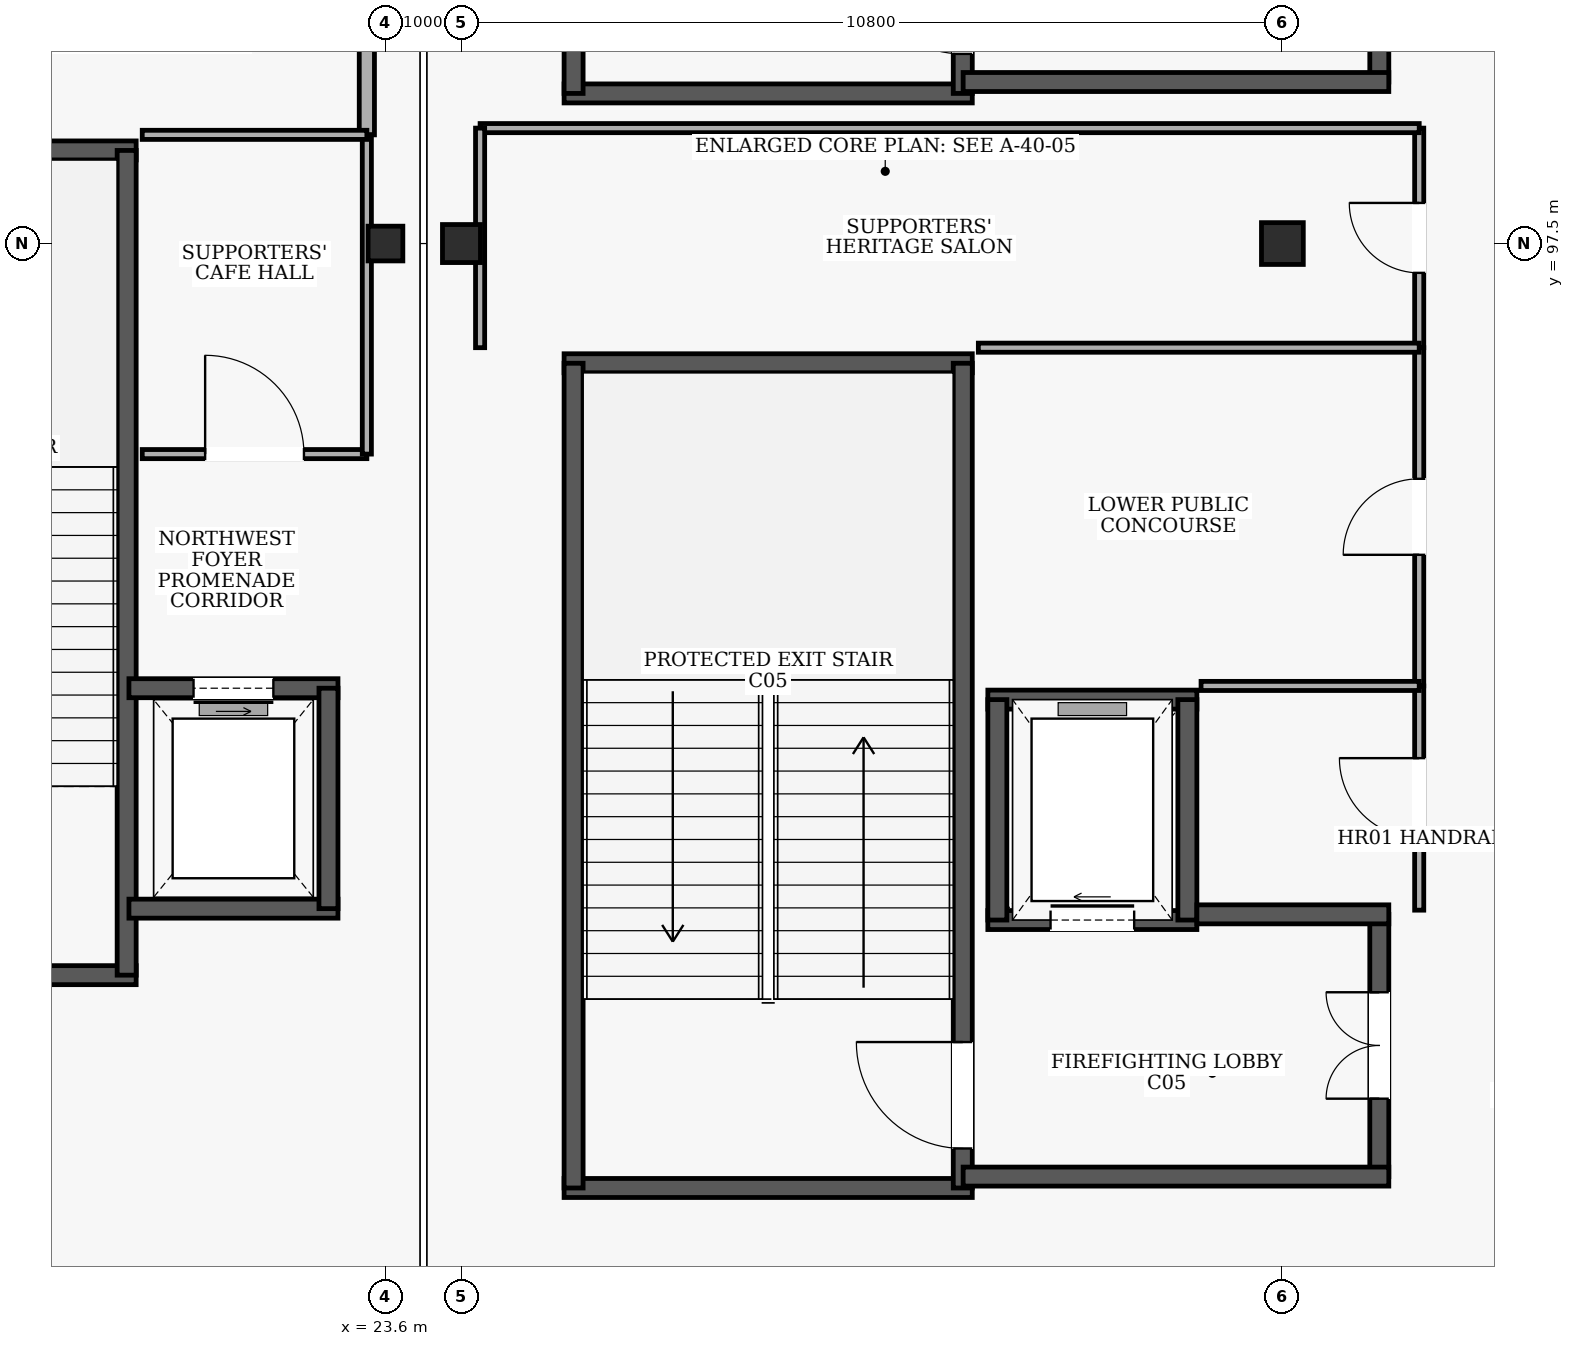
"""IFC4 building model, lengths in metres.
Left out: names, types, materials, properties, quantities, classifications, styles, units other than length and angle.
Written with IfcOpenShell. Run it as: python <this file> out.ifc"""

import sys

from ifc_helpers import new_model, si_unit, direction, frame, frame_2d, origin, origin_2d, place, context, subcontext, project, spatial, rectangle, hollow_circle, extrude, element, fill, save


model = new_model("IFC4")
c1 = context("Model", 3, precision=1e-05, world=origin(), true_north=direction((0.0, 1.0)))
c2 = subcontext(c1, "Body", "Model", "MODEL_VIEW")
j1 = project(units=[si_unit("LENGTHUNIT", "METRE"), si_unit("PLANEANGLEUNIT", "RADIAN")], contexts=[c1])
p1 = place(None, origin())
s1 = spatial("IfcSite", under=j1, at=p1, CompositionType="ELEMENT")
p2 = place(p1, origin())
s2 = spatial("IfcBuilding", under=s1, at=p2, CompositionType="ELEMENT")
p3 = place(p2, frame((0.0, 0.0, 5.4)))
s3 = spatial("IfcBuildingStorey", under=s2, at=p3, CompositionType="ELEMENT", Elevation=5.4)
p4 = place(p3, frame((23.6, 97.5, 0.0), z_axis=(0.0, 0.0, 1.0), x_axis=(1.0, 0.0, 0.0)))
e1 = element("IfcColumn", 1, at=p4, inside=s3, PredefinedType="COLUMN", context=c2, shape_type="SweptSolid", body=[
    extrude(hollow_circle(Radius=0.229, WallThickness=0.02, at=origin_2d()), origin(), (0.0, 0.0, 1.0), 4.8),
])
p5 = place(p3, frame((24.6, 97.5, 0.0), z_axis=(0.0, 0.0, 1.0), x_axis=(1.0, 0.0, 0.0)))
e2 = element("IfcColumn", 2, at=p5, inside=s3, PredefinedType="COLUMN", context=c2, shape_type="SweptSolid", body=[
    extrude(rectangle(XDim=0.5, YDim=0.5, at=origin_2d()), origin(), (0.0, 0.0, 1.0), 4.8),
])
p6 = place(p3, frame((35.4, 97.5, 0.0), z_axis=(0.0, 0.0, 1.0), x_axis=(1.0, 0.0, 0.0)))
e3 = element("IfcColumn", 3, at=p6, inside=s3, PredefinedType="COLUMN", context=c2, shape_type="SweptSolid", body=[
    extrude(rectangle(XDim=0.55, YDim=0.55, at=origin_2d()), origin(), (0.0, 0.0, 1.0), 4.8),
])
for number, where, z_axis, x_axis in (
    (4, (25.95, 85.075, 0.0), (0.0, 0.0, 1.0), (1.0, 0.0, 0.0)),
    (5, (31.32, 95.925, 0.0), (0.0, 0.0, 1.0), (-1.0, 0.0, 0.0)),
):
    element("IfcWall", number, at=place(p3, frame(where, z_axis=z_axis, x_axis=x_axis)), inside=s3, PredefinedType="SHEAR", context=c2, shape_type="SweptSolid", body=[
        extrude(rectangle(XDim=5.37, YDim=0.25, at=frame_2d((2.685, 0.0))), origin(), (0.0, 0.0, 1.0), 4.5),
    ])
p7 = place(p3, frame((26.075, 85.075, 0.0), z_axis=(0.0, 0.0, 1.0), x_axis=(0.0, 1.0, 0.0)))
e6 = element("IfcWall", 6, at=p7, inside=s3, PredefinedType="SHEAR", context=c2, shape_type="SweptSolid", body=[
    extrude(rectangle(XDim=10.85, YDim=0.25, at=frame_2d((5.425, 0.0))), origin(), (0.0, 0.0, 1.0), 4.5),
])
p8 = place(p3, frame((31.195, 85.075, 0.0), z_axis=(0.0, 0.0, 1.0), x_axis=(0.0, 1.0, 0.0)))
e7 = element("IfcWall", 7, at=p8, inside=s3, PredefinedType="SHEAR", context=c2, shape_type="SweptSolid", body=[
    extrude(rectangle(XDim=10.85, YDim=0.25, at=frame_2d((5.425, 0.0))), origin(), (0.0, 0.0, 1.0), 4.5),
])
p9 = place(p8, frame((0.52, 0.0, 0.0)))
e8 = element("IfcOpeningElement", 8, at=p9, cuts=e7, PredefinedType="OPENING", context=c2, shape_type="SweptSolid", body=[
    extrude(rectangle(XDim=1.4, YDim=2.15, at=frame_2d((0.7, 1.075))), frame((0.0, 0.135, 0.0), z_axis=(0.0, -1.0, 0.0), x_axis=(1.0, 0.0, 0.0)), (0.0, 0.0, 1.0), 0.27),
])
p10 = place(p3, frame((25.95, 99.475, 0.0), z_axis=(0.0, 0.0, 1.0), x_axis=(1.0, 0.0, 0.0)))
e9 = element("IfcWall", 9, at=p10, inside=s3, PredefinedType="SHEAR", context=c2, shape_type="SweptSolid", body=[
    extrude(rectangle(XDim=5.37, YDim=0.25, at=frame_2d((2.685, 0.0))), origin(), (0.0, 0.0, 1.0), 4.5),
])
p11 = place(p3, frame((26.075, 99.475, 0.0), z_axis=(0.0, 0.0, 1.0), x_axis=(0.0, 1.0, 0.0)))
e10 = element("IfcWall", 10, at=p11, inside=s3, PredefinedType="SHEAR", context=c2, shape_type="SweptSolid", body=[
    extrude(rectangle(XDim=10.85, YDim=0.25, at=frame_2d((5.425, 0.0))), origin(), (0.0, 0.0, 1.0), 4.5),
])
p12 = place(p3, frame((31.195, 99.475, 0.0), z_axis=(0.0, 0.0, 1.0), x_axis=(0.0, 1.0, 0.0)))
e11 = element("IfcWall", 11, at=p12, inside=s3, PredefinedType="SHEAR", context=c2, shape_type="SweptSolid", body=[
    extrude(rectangle(XDim=10.85, YDim=0.25, at=frame_2d((5.425, 0.0))), origin(), (0.0, 0.0, 1.0), 4.5),
])
p13 = place(p12, frame((0.52, 0.0, 0.0)))
e12 = element("IfcOpeningElement", 12, at=p13, cuts=e11, PredefinedType="OPENING", context=c2, shape_type="SweptSolid", body=[
    extrude(rectangle(XDim=1.4, YDim=2.15, at=frame_2d((0.7, 1.075))), frame((0.0, 0.135, 0.0), z_axis=(0.0, -1.0, 0.0), x_axis=(1.0, 0.0, 0.0)), (0.0, 0.0, 1.0), 0.27),
])
for number, where, z_axis, x_axis in (
    (13, (14.95, 87.875, 0.0), (0.0, 0.0, 1.0), (1.0, 0.0, 0.0)),
    (14, (20.32, 98.725, 0.0), (0.0, 0.0, 1.0), (-1.0, 0.0, 0.0)),
):
    element("IfcWall", number, at=place(p3, frame(where, z_axis=z_axis, x_axis=x_axis)), inside=s3, PredefinedType="SHEAR", context=c2, shape_type="SweptSolid", body=[
        extrude(rectangle(XDim=5.37, YDim=0.25, at=frame_2d((2.685, 0.0))), origin(), (0.0, 0.0, 1.0), 4.5),
    ])
p14 = place(p3, frame((20.195, 87.875, 0.0), z_axis=(0.0, 0.0, 1.0), x_axis=(0.0, 1.0, 0.0)))
e15 = element("IfcWall", 15, at=p14, inside=s3, PredefinedType="SHEAR", context=c2, shape_type="SweptSolid", body=[
    extrude(rectangle(XDim=10.85, YDim=0.25, at=frame_2d((5.425, 0.0))), origin(), (0.0, 0.0, 1.0), 4.5),
])
p15 = place(p3, frame((31.525, 88.6, 0.0), z_axis=(0.0, 0.0, 1.0), x_axis=(1.0, 0.0, 0.0)))
e16 = element("IfcWall", 16, at=p15, inside=s3, PredefinedType="SHEAR", context=c2, shape_type="SweptSolid", body=[
    extrude(rectangle(XDim=2.75, YDim=0.25, at=frame_2d((1.375, 0.0))), origin(), (0.0, 0.0, 1.0), 4.5),
])
p16 = place(p15, frame((0.825, 0.0, 0.0)))
e17 = element("IfcOpeningElement", 17, at=p16, cuts=e16, PredefinedType="OPENING", context=c2, shape_type="SweptSolid", body=[
    extrude(rectangle(XDim=1.1, YDim=2.15, at=frame_2d((0.55, 1.075))), frame((0.0, 0.135, 0.0), z_axis=(0.0, -1.0, 0.0), x_axis=(1.0, 0.0, 0.0)), (0.0, 0.0, 1.0), 0.27),
])
p17 = place(p3, frame((34.275, 91.5, 0.0), z_axis=(0.0, 0.0, 1.0), x_axis=(-1.0, 0.0, 0.0)))
e18 = element("IfcWall", 18, at=p17, inside=s3, PredefinedType="SHEAR", context=c2, shape_type="SweptSolid", body=[
    extrude(rectangle(XDim=2.75, YDim=0.25, at=frame_2d((1.375, 0.0))), origin(), (0.0, 0.0, 1.0), 4.5),
])
for number, where, z_axis, x_axis in (
    (19, (31.65, 91.5, 0.0), (0.0, 0.0, 1.0), (0.0, -1.0, 0.0)),
    (20, (34.15, 88.6, 0.0), (0.0, 0.0, 1.0), (0.0, 1.0, 0.0)),
):
    element("IfcWall", number, at=place(p3, frame(where, z_axis=z_axis, x_axis=x_axis)), inside=s3, PredefinedType="SHEAR", context=c2, shape_type="SweptSolid", body=[
        extrude(rectangle(XDim=2.9, YDim=0.25, at=frame_2d((1.45, 0.0))), origin(), (0.0, 0.0, 1.0), 4.5),
    ])
p18 = place(p3, frame((36.675, 85.225, 0.0), z_axis=(0.0, 0.0, 1.0), x_axis=(0.0, 1.0, 0.0)))
e21 = element("IfcWall", 21, at=p18, inside=s3, PredefinedType="SHEAR", context=c2, shape_type="SweptSolid", body=[
    extrude(rectangle(XDim=3.45, YDim=0.25, at=frame_2d((1.725, 0.0))), origin(), (0.0, 0.0, 1.0), 4.5),
])
p19 = place(p18, frame((1.025, 0.0, 0.0)))
e22 = element("IfcOpeningElement", 22, at=p19, cuts=e21, PredefinedType="OPENING", context=c2, shape_type="SweptSolid", body=[
    extrude(rectangle(XDim=1.4, YDim=2.15, at=frame_2d((0.7, 1.075))), frame((0.0, 0.135, 0.0), z_axis=(0.0, -1.0, 0.0), x_axis=(1.0, 0.0, 0.0)), (0.0, 0.0, 1.0), 0.27),
])
p20 = place(p3, frame((34.275, 88.675, 0.0), z_axis=(0.0, 0.0, 1.0), x_axis=(1.0, 0.0, 0.0)))
e23 = element("IfcWall", 23, at=p20, inside=s3, PredefinedType="SHEAR", context=c2, shape_type="SweptSolid", body=[
    extrude(rectangle(XDim=2.525, YDim=0.25, at=frame_2d((1.263, 0.0))), origin(), (0.0, 0.0, 1.0), 4.5),
])
p21 = place(p3, frame((31.2, 85.225, 0.0), z_axis=(0.0, 0.0, 1.0), x_axis=(1.0, 0.0, 0.0)))
e24 = element("IfcWall", 24, at=p21, inside=s3, PredefinedType="SHEAR", context=c2, shape_type="SweptSolid", body=[
    extrude(rectangle(XDim=5.6, YDim=0.25, at=frame_2d((2.8, 0.0))), origin(), (0.0, 0.0, 1.0), 4.5),
])
p22 = place(p3, frame((36.675, 99.625, 0.0), z_axis=(0.0, 0.0, 1.0), x_axis=(0.0, 1.0, 0.0)))
e25 = element("IfcWall", 25, at=p22, inside=s3, PredefinedType="SHEAR", context=c2, shape_type="SweptSolid", body=[
    extrude(rectangle(XDim=3.45, YDim=0.25, at=frame_2d((1.725, 0.0))), origin(), (0.0, 0.0, 1.0), 4.5),
])
p23 = place(p22, frame((1.025, 0.0, 0.0)))
e26 = element("IfcOpeningElement", 26, at=p23, cuts=e25, PredefinedType="OPENING", context=c2, shape_type="SweptSolid", body=[
    extrude(rectangle(XDim=1.4, YDim=2.15, at=frame_2d((0.7, 1.075))), frame((0.0, 0.135, 0.0), z_axis=(0.0, -1.0, 0.0), x_axis=(1.0, 0.0, 0.0)), (0.0, 0.0, 1.0), 0.27),
])
p24 = place(p3, frame((31.2, 99.625, 0.0), z_axis=(0.0, 0.0, 1.0), x_axis=(1.0, 0.0, 0.0)))
e27 = element("IfcWall", 27, at=p24, inside=s3, PredefinedType="SHEAR", context=c2, shape_type="SweptSolid", body=[
    extrude(rectangle(XDim=5.6, YDim=0.25, at=frame_2d((2.8, 0.0))), origin(), (0.0, 0.0, 1.0), 4.5),
])
p25 = place(p3, frame((20.225, 88.75, 0.0), z_axis=(0.0, 0.0, 1.0), x_axis=(1.0, 0.0, 0.0)))
e28 = element("IfcWall", 28, at=p25, inside=s3, PredefinedType="SHEAR", context=c2, shape_type="SweptSolid", body=[
    extrude(rectangle(XDim=2.75, YDim=0.25, at=frame_2d((1.375, 0.0))), origin(), (0.0, 0.0, 1.0), 4.5),
])
p26 = place(p3, frame((22.975, 91.65, 0.0), z_axis=(0.0, 0.0, 1.0), x_axis=(-1.0, 0.0, 0.0)))
e29 = element("IfcWall", 29, at=p26, inside=s3, PredefinedType="SHEAR", context=c2, shape_type="SweptSolid", body=[
    extrude(rectangle(XDim=2.75, YDim=0.25, at=frame_2d((1.375, 0.0))), origin(), (0.0, 0.0, 1.0), 4.5),
])
p27 = place(p26, frame((0.85, 0.0, 0.0)))
e30 = element("IfcOpeningElement", 30, at=p27, cuts=e29, PredefinedType="OPENING", context=c2, shape_type="SweptSolid", body=[
    extrude(rectangle(XDim=1.05, YDim=2.15, at=frame_2d((0.525, 1.075))), frame((0.0, 0.135, 0.0), z_axis=(0.0, -1.0, 0.0), x_axis=(1.0, 0.0, 0.0)), (0.0, 0.0, 1.0), 0.27),
])
p28 = place(p3, frame((22.85, 88.75, 0.0), z_axis=(0.0, 0.0, 1.0), x_axis=(0.0, 1.0, 0.0)))
e31 = element("IfcWall", 31, at=p28, inside=s3, PredefinedType="SHEAR", context=c2, shape_type="SweptSolid", body=[
    extrude(rectangle(XDim=2.9, YDim=0.25, at=frame_2d((1.45, 0.0))), origin(), (0.0, 0.0, 1.0), 4.5),
])
p29 = place(p3, frame((37.2, 96.13, 0.0), z_axis=(0.0, 0.0, 1.0), x_axis=(0.0, 1.0, 0.0)))
e32 = element("IfcWall", 32, at=p29, inside=s3, PredefinedType="PARTITIONING", context=c2, shape_type="SweptSolid", body=[
    extrude(rectangle(XDim=2.889, YDim=0.12, at=frame_2d((1.444, 0.0))), origin(), (0.0, 0.0, 1.0), 4.5),
])
p30 = place(p29, frame((0.984, 0.0, 0.0)))
e33 = element("IfcOpeningElement", 33, at=p30, cuts=e32, PredefinedType="OPENING", context=c2, shape_type="SweptSolid", body=[
    extrude(rectangle(XDim=0.92, YDim=2.1, at=frame_2d((0.46, 1.05))), frame((0.0, 0.07, 0.0), z_axis=(0.0, -1.0, 0.0), x_axis=(1.0, 0.0, 0.0)), (0.0, 0.0, 1.0), 0.14),
])
p31 = place(p3, frame((37.2, 99.019, 0.0), z_axis=(0.0, 0.0, 1.0), x_axis=(-1.0, 0.0, 0.0)))
e34 = element("IfcWall", 34, at=p31, inside=s3, PredefinedType="PARTITIONING", context=c2, shape_type="SweptSolid", body=[
    extrude(rectangle(XDim=12.355, YDim=0.12, at=frame_2d((6.177, 0.0))), origin(), (0.0, 0.0, 1.0), 4.5),
])
p32 = place(p3, frame((24.845, 99.019, 0.0), z_axis=(0.0, 0.0, 1.0), x_axis=(0.0, -1.0, 0.0)))
e35 = element("IfcWall", 35, at=p32, inside=s3, PredefinedType="PARTITIONING", context=c2, shape_type="SweptSolid", body=[
    extrude(rectangle(XDim=2.889, YDim=0.12, at=frame_2d((1.444, 0.0))), origin(), (0.0, 0.0, 1.0), 3.58),
])
p33 = place(p3, frame((37.2, 91.68, 0.0), z_axis=(0.0, 0.0, 1.0), x_axis=(0.0, 1.0, 0.0)))
e36 = element("IfcWall", 36, at=p33, inside=s3, PredefinedType="PARTITIONING", context=c2, shape_type="SweptSolid", body=[
    extrude(rectangle(XDim=4.45, YDim=0.12, at=frame_2d((2.225, 0.0))), origin(), (0.0, 0.0, 1.0), 4.5),
])
p34 = place(p33, frame((1.725, 0.0, 0.0)))
e37 = element("IfcOpeningElement", 37, at=p34, cuts=e36, PredefinedType="OPENING", context=c2, shape_type="SweptSolid", body=[
    extrude(rectangle(XDim=1.0, YDim=2.1, at=frame_2d((0.5, 1.05))), frame((0.0, 0.07, 0.0), z_axis=(0.0, -1.0, 0.0), x_axis=(1.0, 0.0, 0.0)), (0.0, 0.0, 1.0), 0.14),
])
p35 = place(p3, frame((37.2, 96.13, 0.0), z_axis=(0.0, 0.0, 1.0), x_axis=(-1.0, 0.0, 0.0)))
e38 = element("IfcWall", 38, at=p35, inside=s3, PredefinedType="PARTITIONING", context=c2, shape_type="SweptSolid", body=[
    extrude(rectangle(XDim=5.8, YDim=0.12, at=frame_2d((2.9, 0.0))), origin(), (0.0, 0.0, 1.0), 4.5),
])
p36 = place(p3, frame((37.2, 88.73, 0.0), z_axis=(0.0, 0.0, 1.0), x_axis=(0.0, 1.0, 0.0)))
e39 = element("IfcWall", 39, at=p36, inside=s3, PredefinedType="PARTITIONING", context=c2, shape_type="SweptSolid", body=[
    extrude(rectangle(XDim=2.95, YDim=0.12, at=frame_2d((1.475, 0.0))), origin(), (0.0, 0.0, 1.0), 4.5),
])
p37 = place(p36, frame((0.95, 0.0, 0.0)))
e40 = element("IfcOpeningElement", 40, at=p37, cuts=e39, PredefinedType="OPENING", context=c2, shape_type="SweptSolid", body=[
    extrude(rectangle(XDim=1.05, YDim=2.15, at=frame_2d((0.525, 1.075))), frame((0.0, 0.07, 0.0), z_axis=(0.0, -1.0, 0.0), x_axis=(1.0, 0.0, 0.0)), (0.0, 0.0, 1.0), 0.14),
])
p38 = place(p3, frame((37.2, 91.68, 0.0), z_axis=(0.0, 0.0, 1.0), x_axis=(-1.0, 0.0, 0.0)))
e41 = element("IfcWall", 41, at=p38, inside=s3, PredefinedType="PARTITIONING", context=c2, shape_type="SweptSolid", body=[
    extrude(rectangle(XDim=2.87, YDim=0.12, at=frame_2d((1.435, 0.0))), origin(), (0.0, 0.0, 1.0), 4.5),
])
p39 = place(p3, frame((23.355, 98.93, 0.0), z_axis=(0.0, 0.0, 1.0), x_axis=(0.0, 1.0, 0.0)))
e42 = element("IfcWall", 42, at=p39, inside=s3, PredefinedType="PARTITIONING", context=c2, shape_type="SweptSolid", body=[
    extrude(rectangle(XDim=12.12, YDim=0.2, at=frame_2d((6.06, 0.0))), origin(), (0.0, 0.0, 1.0), 3.78),
])
p40 = place(p3, frame((20.4, 94.73, 0.0), z_axis=(0.0, 0.0, 1.0), x_axis=(1.0, 0.0, 0.0)))
e43 = element("IfcWall", 43, at=p40, inside=s3, PredefinedType="PARTITIONING", context=c2, shape_type="SweptSolid", body=[
    extrude(rectangle(XDim=2.955, YDim=0.12, at=frame_2d((1.478, 0.0))), origin(), (0.0, 0.0, 1.0), 4.5),
])
p41 = place(p40, frame((0.827, 0.0, 0.0)))
e44 = element("IfcOpeningElement", 44, at=p41, cuts=e43, PredefinedType="OPENING", context=c2, shape_type="SweptSolid", body=[
    extrude(rectangle(XDim=1.3, YDim=2.2, at=frame_2d((0.65, 1.1))), frame((0.0, 0.07, 0.0), z_axis=(0.0, -1.0, 0.0), x_axis=(1.0, 0.0, 0.0)), (0.0, 0.0, 1.0), 0.14),
])
p42 = place(p3, frame((23.355, 94.73, 0.0), z_axis=(0.0, 0.0, 1.0), x_axis=(0.0, 1.0, 0.0)))
e45 = element("IfcWall", 45, at=p42, inside=s3, PredefinedType="PARTITIONING", context=c2, shape_type="SweptSolid", body=[
    extrude(rectangle(XDim=4.2, YDim=0.12, at=frame_2d((2.1, 0.0))), origin(), (0.0, 0.0, 1.0), 3.78),
])
p43 = place(p3, frame((23.355, 98.93, 0.0), z_axis=(0.0, 0.0, 1.0), x_axis=(-1.0, 0.0, 0.0)))
e46 = element("IfcWall", 46, at=p43, inside=s3, PredefinedType="PARTITIONING", context=c2, shape_type="SweptSolid", body=[
    extrude(rectangle(XDim=2.955, YDim=0.12, at=frame_2d((1.478, 0.0))), origin(), (0.0, 0.0, 1.0), 4.5),
])
p44 = place(p9, origin())
e47 = element("IfcDoor", 47, at=p44, inside=s3, OperationType="SINGLE_SWING_RIGHT", PredefinedType="DOOR", context=c2, shape_type="SweptSolid", body=[
    extrude(rectangle(XDim=1.4, YDim=2.15, at=frame_2d((0.7, 1.075))), frame((0.0, 0.025, 0.0), z_axis=(0.0, -1.0, 0.0), x_axis=(1.0, 0.0, 0.0)), (0.0, 0.0, 1.0), 0.05),
])
fill(e8, e47)
p45 = place(p13, origin())
e48 = element("IfcDoor", 48, at=p45, inside=s3, OperationType="SINGLE_SWING_RIGHT", PredefinedType="DOOR", context=c2, shape_type="SweptSolid", body=[
    extrude(rectangle(XDim=1.4, YDim=2.15, at=frame_2d((0.7, 1.075))), frame((0.0, 0.025, 0.0), z_axis=(0.0, -1.0, 0.0), x_axis=(1.0, 0.0, 0.0)), (0.0, 0.0, 1.0), 0.05),
])
fill(e12, e48)
p46 = place(p16, origin())
e49 = element("IfcDoor", 49, at=p46, inside=s3, OperationType="SLIDING_TO_RIGHT", PredefinedType="DOOR", context=c2, shape_type="SweptSolid", body=[
    extrude(rectangle(XDim=1.1, YDim=2.15, at=frame_2d((0.55, 1.075))), frame((0.0, 0.025, 0.0), z_axis=(0.0, -1.0, 0.0), x_axis=(1.0, 0.0, 0.0)), (0.0, 0.0, 1.0), 0.05),
])
fill(e17, e49)
p47 = place(p19, origin())
e50 = element("IfcDoor", 50, at=p47, inside=s3, OperationType="DOUBLE_DOOR_SINGLE_SWING", PredefinedType="DOOR", context=c2, shape_type="SweptSolid", body=[
    extrude(rectangle(XDim=1.4, YDim=2.15, at=frame_2d((0.7, 1.075))), frame((0.0, 0.025, 0.0), z_axis=(0.0, -1.0, 0.0), x_axis=(1.0, 0.0, 0.0)), (0.0, 0.0, 1.0), 0.05),
])
fill(e22, e50)
p48 = place(p27, origin())
e51 = element("IfcDoor", 51, at=p48, inside=s3, OperationType="SLIDING_TO_RIGHT", PredefinedType="DOOR", context=c2, shape_type="SweptSolid", body=[
    extrude(rectangle(XDim=1.05, YDim=2.15, at=frame_2d((0.525, 1.075))), frame((0.0, 0.025, 0.0), z_axis=(0.0, -1.0, 0.0), x_axis=(1.0, 0.0, 0.0)), (0.0, 0.0, 1.0), 0.05),
])
fill(e30, e51)
p49 = place(p30, origin())
e52 = element("IfcDoor", 52, at=p49, inside=s3, OperationType="SINGLE_SWING_RIGHT", PredefinedType="DOOR", context=c2, shape_type="SweptSolid", body=[
    extrude(rectangle(XDim=0.92, YDim=2.1, at=frame_2d((0.46, 1.05))), frame((0.0, 0.025, 0.0), z_axis=(0.0, -1.0, 0.0), x_axis=(1.0, 0.0, 0.0)), (0.0, 0.0, 1.0), 0.05),
])
fill(e33, e52)
p50 = place(p34, origin())
e53 = element("IfcDoor", 53, at=p50, inside=s3, OperationType="SINGLE_SWING_LEFT", PredefinedType="DOOR", context=c2, shape_type="SweptSolid", body=[
    extrude(rectangle(XDim=1.0, YDim=2.1, at=frame_2d((0.5, 1.05))), frame((0.0, 0.025, 0.0), z_axis=(0.0, -1.0, 0.0), x_axis=(1.0, 0.0, 0.0)), (0.0, 0.0, 1.0), 0.05),
])
fill(e37, e53)
p51 = place(p37, origin())
e54 = element("IfcDoor", 54, at=p51, inside=s3, OperationType="SINGLE_SWING_RIGHT", PredefinedType="DOOR", context=c2, shape_type="SweptSolid", body=[
    extrude(rectangle(XDim=1.05, YDim=2.15, at=frame_2d((0.525, 1.075))), frame((0.0, 0.025, 0.0), z_axis=(0.0, -1.0, 0.0), x_axis=(1.0, 0.0, 0.0)), (0.0, 0.0, 1.0), 0.05),
])
fill(e40, e54)
p52 = place(p41, origin())
e55 = element("IfcDoor", 55, at=p52, inside=s3, OperationType="SINGLE_SWING_LEFT", PredefinedType="DOOR", context=c2, shape_type="SweptSolid", body=[
    extrude(rectangle(XDim=1.3, YDim=2.2, at=frame_2d((0.65, 1.1))), frame((0.0, 0.025, 0.0), z_axis=(0.0, -1.0, 0.0), x_axis=(1.0, 0.0, 0.0)), (0.0, 0.0, 1.0), 0.05),
])
fill(e44, e55)
save(model, sys.argv[1])
